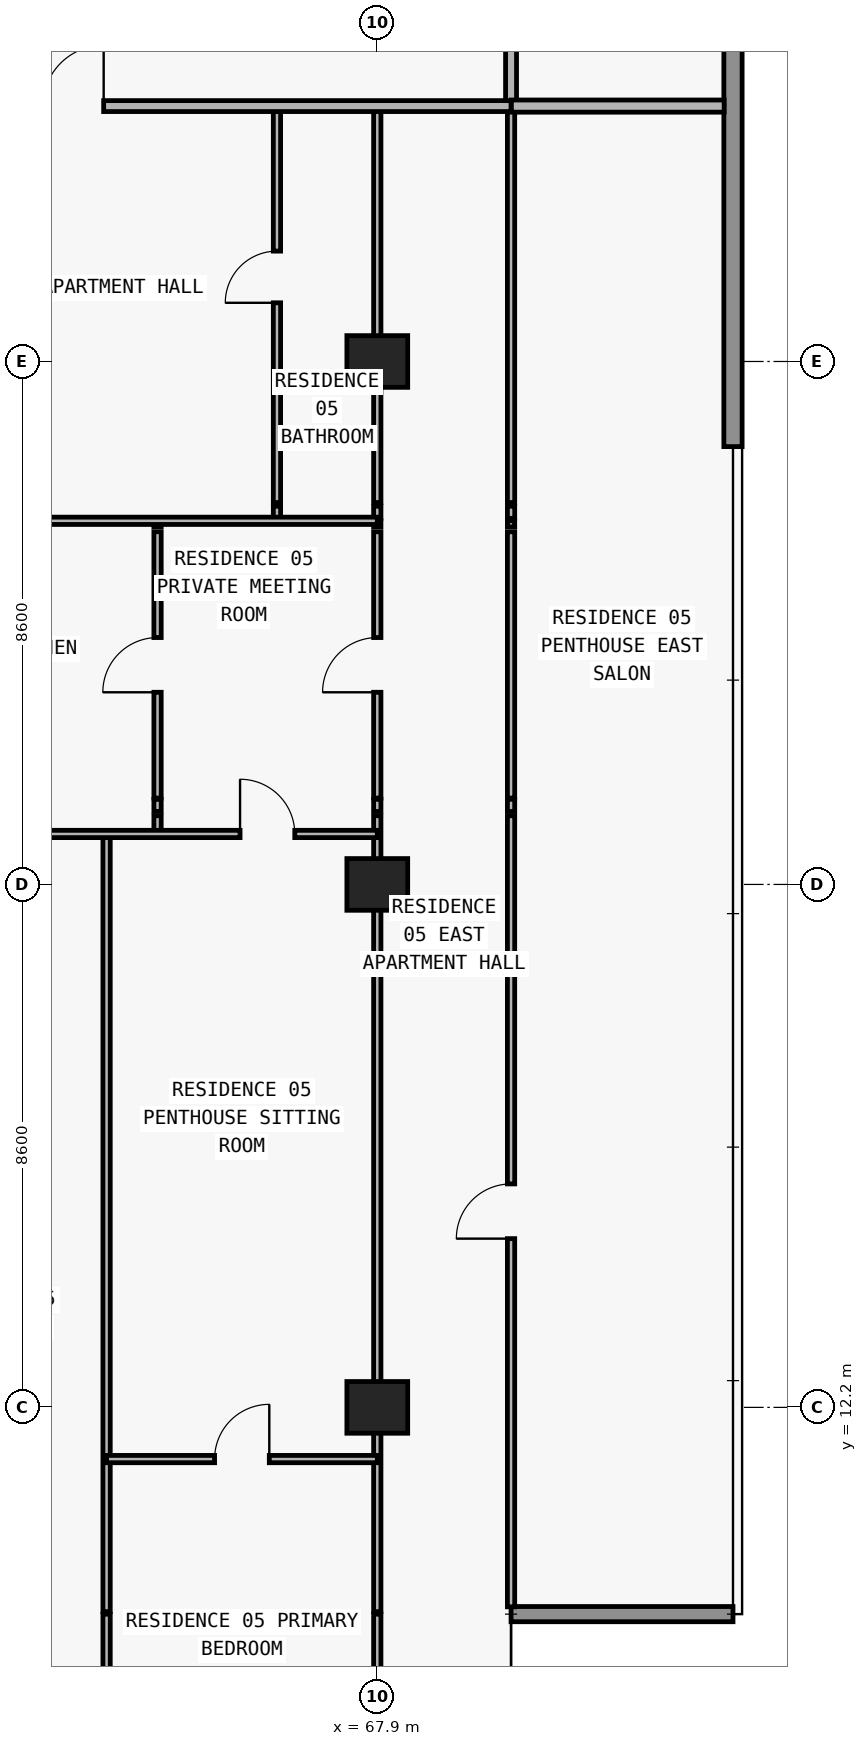
"""IFC4 building model, lengths in metres.
Left out: names, types, materials, properties, quantities, classifications, styles, units other than length and angle.
Written with IfcOpenShell. Run it as: python <this file> out.ifc"""

import sys

from ifc_helpers import new_model, si_unit, direction, frame, frame_2d, origin, origin_2d, place, context, subcontext, project, spatial, rectangle, extrude, element, fill, save


model = new_model("IFC4")
c1 = context("Model", 3, precision=1e-05, world=origin(), true_north=direction((0.0, 1.0)))
c2 = subcontext(c1, "Body", "Model", "MODEL_VIEW")
j1 = project(units=[si_unit("LENGTHUNIT", "METRE"), si_unit("PLANEANGLEUNIT", "RADIAN")], contexts=[c1])
p1 = place(None, origin())
s1 = spatial("IfcSite", under=j1, at=p1, CompositionType="ELEMENT")
p2 = place(p1, origin())
s2 = spatial("IfcBuilding", under=s1, at=p2, CompositionType="ELEMENT")
p3 = place(p2, frame((0.0, 0.0, 112.5)))
s3 = spatial("IfcBuildingStorey", under=s2, at=p3, CompositionType="ELEMENT", Elevation=112.5)
for number, where, z_axis, x_axis in (
    (1, (67.9, 12.2, 0.0), (0.0, 0.0, 1.0), (1.0, 0.0, 0.0)),
    (2, (67.9, 20.8, 0.0), (0.0, 0.0, 1.0), (1.0, 0.0, 0.0)),
    (3, (67.9, 29.4, 0.0), (0.0, 0.0, 1.0), (1.0, 0.0, 0.0)),
):
    element("IfcColumn", number, at=place(p3, frame(where, z_axis=z_axis, x_axis=x_axis)), inside=s3, PredefinedType="COLUMN", context=c2, shape_type="SweptSolid", body=[
        extrude(rectangle(XDim=1.0, YDim=0.85, at=origin_2d()), origin(), (0.0, 0.0, 1.0), 3.05),
    ])
p4 = place(p3, frame((70.1, 8.8, 0.0), z_axis=(0.0, 0.0, 1.0), x_axis=(1.0, 0.0, 0.0)))
e4 = element("IfcWall", 4, at=p4, inside=s3, PredefinedType="ELEMENTEDWALL", context=c2, shape_type="SweptSolid", body=[
    extrude(rectangle(XDim=3.65, YDim=0.25, at=frame_2d((1.825, 0.0))), origin(), (0.0, 0.0, 1.0), 3.05),
])
p5 = place(p3, frame((73.75, 47.2, 0.0), z_axis=(0.0, 0.0, 1.0), x_axis=(0.0, -1.0, 0.0)))
e5 = element("IfcWall", 5, at=p5, inside=s3, PredefinedType="STANDARD", context=c2, shape_type="SweptSolid", body=[
    extrude(rectangle(XDim=19.2, YDim=0.3, at=frame_2d((9.6, 0.0))), origin(), (0.0, 0.0, 1.0), 3.05),
])
p6 = place(p3, frame((63.448, 5.695, 0.0), z_axis=(0.0, 0.0, 1.0), x_axis=(0.0, 1.0, 0.0)))
e6 = element("IfcWall", 6, at=p6, inside=s3, PredefinedType="PARTITIONING", context=c2, shape_type="SweptSolid", body=[
    extrude(rectangle(XDim=3.105, YDim=0.12, at=frame_2d((1.552, 0.0))), origin(), (0.0, 0.0, 1.0), 3.05),
])
p7 = place(p3, frame((63.448, 8.84, 0.0), z_axis=(0.0, 0.0, 1.0), x_axis=(0.0, 1.0, 0.0)))
e7 = element("IfcWall", 7, at=p7, inside=s3, PredefinedType="PARTITIONING", context=c2, shape_type="SweptSolid", body=[
    extrude(rectangle(XDim=12.79, YDim=0.12, at=frame_2d((6.395, 0.0))), origin(), (0.0, 0.0, 1.0), 3.05),
])
p8 = place(p3, frame((64.286, 21.63, 0.0), z_axis=(0.0, 0.0, 1.0), x_axis=(0.0, 1.0, 0.0)))
e8 = element("IfcWall", 8, at=p8, inside=s3, PredefinedType="PARTITIONING", context=c2, shape_type="SweptSolid", body=[
    extrude(rectangle(XDim=0.3, YDim=0.12, at=frame_2d((0.15, 0.0))), origin(), (0.0, 0.0, 1.0), 3.05),
])
p9 = place(p3, frame((64.286, 22.0, 0.0), z_axis=(0.0, 0.0, 1.0), x_axis=(0.0, 1.0, 0.0)))
e9 = element("IfcWall", 9, at=p9, inside=s3, PredefinedType="PARTITIONING", context=c2, shape_type="SweptSolid", body=[
    extrude(rectangle(XDim=0.2, YDim=0.12, at=frame_2d((0.1, 0.0))), origin(), (0.0, 0.0, 1.0), 3.05),
])
p10 = place(p3, frame((64.286, 22.22, 0.0), z_axis=(0.0, 0.0, 1.0), x_axis=(0.0, 1.0, 0.0)))
e10 = element("IfcWall", 10, at=p10, inside=s3, PredefinedType="PARTITIONING", context=c2, shape_type="SweptSolid", body=[
    extrude(rectangle(XDim=4.38, YDim=0.12, at=frame_2d((2.19, 0.0))), origin(), (0.0, 0.0, 1.0), 3.05),
])
p11 = place(p10, frame((1.74, 0.0, 0.0)))
e11 = element("IfcOpeningElement", 11, at=p11, cuts=e10, PredefinedType="OPENING", context=c2, shape_type="SweptSolid", body=[
    extrude(rectangle(XDim=0.9, YDim=2.15, at=frame_2d((0.45, 1.075))), frame((0.0, 0.07, 0.0), z_axis=(0.0, -1.0, 0.0), x_axis=(1.0, 0.0, 0.0)), (0.0, 0.0, 1.0), 0.14),
])
p12 = place(p3, frame((64.286, 26.68, 0.0), z_axis=(0.0, 0.0, 1.0), x_axis=(0.0, 1.0, 0.0)))
e12 = element("IfcWall", 12, at=p12, inside=s3, PredefinedType="PARTITIONING", context=c2, shape_type="SweptSolid", body=[
    extrude(rectangle(XDim=0.1, YDim=0.12, at=frame_2d((0.05, 0.0))), origin(), (0.0, 0.0, 1.0), 3.05),
])
p13 = place(p3, frame((66.25, 26.82, 0.0), z_axis=(0.0, 0.0, 1.0), x_axis=(0.0, 1.0, 0.0)))
e13 = element("IfcWall", 13, at=p13, inside=s3, PredefinedType="PARTITIONING", context=c2, shape_type="SweptSolid", body=[
    extrude(rectangle(XDim=0.2, YDim=0.12, at=frame_2d((0.1, 0.0))), origin(), (0.0, 0.0, 1.0), 3.05),
])
p14 = place(p3, frame((66.25, 27.08, 0.0), z_axis=(0.0, 0.0, 1.0), x_axis=(0.0, 1.0, 0.0)))
e14 = element("IfcWall", 14, at=p14, inside=s3, PredefinedType="PARTITIONING", context=c2, shape_type="SweptSolid", body=[
    extrude(rectangle(XDim=6.52, YDim=0.12, at=frame_2d((3.26, 0.0))), origin(), (0.0, 0.0, 1.0), 3.05),
])
p15 = place(p14, frame((3.285, 0.0, 0.0)))
e15 = element("IfcOpeningElement", 15, at=p15, cuts=e14, PredefinedType="OPENING", context=c2, shape_type="SweptSolid", body=[
    extrude(rectangle(XDim=0.85, YDim=2.1, at=frame_2d((0.425, 1.05))), frame((0.0, 0.07, 0.0), z_axis=(0.0, -1.0, 0.0), x_axis=(1.0, 0.0, 0.0)), (0.0, 0.0, 1.0), 0.14),
])
p16 = place(p3, frame((67.9, 5.695, 0.0), z_axis=(0.0, 0.0, 1.0), x_axis=(0.0, 1.0, 0.0)))
e16 = element("IfcWall", 16, at=p16, inside=s3, PredefinedType="PARTITIONING", context=c2, shape_type="SweptSolid", body=[
    extrude(rectangle(XDim=3.105, YDim=0.12, at=frame_2d((1.552, 0.0))), origin(), (0.0, 0.0, 1.0), 3.05),
])
p17 = place(p3, frame((67.9, 8.84, 0.0), z_axis=(0.0, 0.0, 1.0), x_axis=(0.0, 1.0, 0.0)))
e17 = element("IfcWall", 17, at=p17, inside=s3, PredefinedType="PARTITIONING", context=c2, shape_type="SweptSolid", body=[
    extrude(rectangle(XDim=13.09, YDim=0.12, at=frame_2d((6.545, 0.0))), origin(), (0.0, 0.0, 1.0), 2.174),
])
p18 = place(p3, frame((67.9, 22.0, 0.0), z_axis=(0.0, 0.0, 1.0), x_axis=(0.0, 1.0, 0.0)))
e18 = element("IfcWall", 18, at=p18, inside=s3, PredefinedType="PARTITIONING", context=c2, shape_type="SweptSolid", body=[
    extrude(rectangle(XDim=0.2, YDim=0.12, at=frame_2d((0.1, 0.0))), origin(), (0.0, 0.0, 1.0), 2.174),
])
p19 = place(p3, frame((67.9, 22.22, 0.0), z_axis=(0.0, 0.0, 1.0), x_axis=(0.0, 1.0, 0.0)))
e19 = element("IfcWall", 19, at=p19, inside=s3, PredefinedType="PARTITIONING", context=c2, shape_type="SweptSolid", body=[
    extrude(rectangle(XDim=4.38, YDim=0.12, at=frame_2d((2.19, 0.0))), origin(), (0.0, 0.0, 1.0), 2.174),
])
p20 = place(p19, frame((1.74, 0.0, 0.0)))
e20 = element("IfcOpeningElement", 20, at=p20, cuts=e19, PredefinedType="OPENING", context=c2, shape_type="SweptSolid", body=[
    extrude(rectangle(XDim=0.9, YDim=2.124, at=frame_2d((0.45, 1.062))), frame((0.0, 0.07, 0.0), z_axis=(0.0, -1.0, 0.0), x_axis=(1.0, 0.0, 0.0)), (0.0, 0.0, 1.0), 0.14),
])
p21 = place(p3, frame((67.9, 26.68, 0.0), z_axis=(0.0, 0.0, 1.0), x_axis=(0.0, 1.0, 0.0)))
e21 = element("IfcWall", 21, at=p21, inside=s3, PredefinedType="PARTITIONING", context=c2, shape_type="SweptSolid", body=[
    extrude(rectangle(XDim=0.1, YDim=0.12, at=frame_2d((0.05, 0.0))), origin(), (0.0, 0.0, 1.0), 2.174),
])
p22 = place(p3, frame((67.9, 26.82, 0.0), z_axis=(0.0, 0.0, 1.0), x_axis=(0.0, 1.0, 0.0)))
e22 = element("IfcWall", 22, at=p22, inside=s3, PredefinedType="PARTITIONING", context=c2, shape_type="SweptSolid", body=[
    extrude(rectangle(XDim=0.2, YDim=0.12, at=frame_2d((0.1, 0.0))), origin(), (0.0, 0.0, 1.0), 2.174),
])
p23 = place(p3, frame((67.9, 27.08, 0.0), z_axis=(0.0, 0.0, 1.0), x_axis=(0.0, 1.0, 0.0)))
e23 = element("IfcWall", 23, at=p23, inside=s3, PredefinedType="PARTITIONING", context=c2, shape_type="SweptSolid", body=[
    extrude(rectangle(XDim=6.52, YDim=0.12, at=frame_2d((3.26, 0.0))), origin(), (0.0, 0.0, 1.0), 2.174),
])
p24 = place(p3, frame((70.1, 8.92, 0.0), z_axis=(0.0, 0.0, 1.0), x_axis=(0.0, 1.0, 0.0)))
e24 = element("IfcWall", 24, at=p24, inside=s3, PredefinedType="PARTITIONING", context=c2, shape_type="SweptSolid", body=[
    extrude(rectangle(XDim=13.01, YDim=0.12, at=frame_2d((6.505, 0.0))), origin(), (0.0, 0.0, 1.0), 3.05),
])
p25 = place(p24, frame((6.055, 0.0, 0.0)))
e25 = element("IfcOpeningElement", 25, at=p25, cuts=e24, PredefinedType="OPENING", context=c2, shape_type="SweptSolid", body=[
    extrude(rectangle(XDim=0.9, YDim=2.15, at=frame_2d((0.45, 1.075))), frame((0.0, 0.07, 0.0), z_axis=(0.0, -1.0, 0.0), x_axis=(1.0, 0.0, 0.0)), (0.0, 0.0, 1.0), 0.14),
])
p26 = place(p3, frame((70.1, 22.0, 0.0), z_axis=(0.0, 0.0, 1.0), x_axis=(0.0, 1.0, 0.0)))
e26 = element("IfcWall", 26, at=p26, inside=s3, PredefinedType="PARTITIONING", context=c2, shape_type="SweptSolid", body=[
    extrude(rectangle(XDim=0.2, YDim=0.12, at=frame_2d((0.1, 0.0))), origin(), (0.0, 0.0, 1.0), 3.05),
])
p27 = place(p3, frame((70.1, 22.22, 0.0), z_axis=(0.0, 0.0, 1.0), x_axis=(0.0, 1.0, 0.0)))
e27 = element("IfcWall", 27, at=p27, inside=s3, PredefinedType="PARTITIONING", context=c2, shape_type="SweptSolid", body=[
    extrude(rectangle(XDim=4.38, YDim=0.12, at=frame_2d((2.19, 0.0))), origin(), (0.0, 0.0, 1.0), 3.05),
])
p28 = place(p3, frame((70.1, 26.68, 0.0), z_axis=(0.0, 0.0, 1.0), x_axis=(0.0, 1.0, 0.0)))
e28 = element("IfcWall", 28, at=p28, inside=s3, PredefinedType="PARTITIONING", context=c2, shape_type="SweptSolid", body=[
    extrude(rectangle(XDim=0.1, YDim=0.12, at=frame_2d((0.05, 0.0))), origin(), (0.0, 0.0, 1.0), 3.05),
])
p29 = place(p3, frame((70.1, 26.82, 0.0), z_axis=(0.0, 0.0, 1.0), x_axis=(0.0, 1.0, 0.0)))
e29 = element("IfcWall", 29, at=p29, inside=s3, PredefinedType="PARTITIONING", context=c2, shape_type="SweptSolid", body=[
    extrude(rectangle(XDim=0.2, YDim=0.12, at=frame_2d((0.1, 0.0))), origin(), (0.0, 0.0, 1.0), 3.05),
])
p30 = place(p3, frame((70.1, 27.08, 0.0), z_axis=(0.0, 0.0, 1.0), x_axis=(0.0, 1.0, 0.0)))
e30 = element("IfcWall", 30, at=p30, inside=s3, PredefinedType="PARTITIONING", context=c2, shape_type="SweptSolid", body=[
    extrude(rectangle(XDim=6.52, YDim=0.12, at=frame_2d((3.26, 0.0))), origin(), (0.0, 0.0, 1.0), 3.05),
])
p31 = place(p3, frame((70.1, 33.605, 0.0), z_axis=(0.0, 0.0, 1.0), x_axis=(0.0, 1.0, 0.0)))
e31 = element("IfcWall", 31, at=p31, inside=s3, PredefinedType="PARTITIONING", context=c2, shape_type="SweptSolid", body=[
    extrude(rectangle(XDim=3.345, YDim=0.18, at=frame_2d((1.672, 0.0))), origin(), (0.0, 0.0, 1.0), 3.05),
])
p32 = place(p3, frame((63.448, 11.35, 0.0), z_axis=(0.0, 0.0, 1.0), x_axis=(1.0, 0.0, 0.0)))
e32 = element("IfcWall", 32, at=p32, inside=s3, PredefinedType="PARTITIONING", context=c2, shape_type="SweptSolid", body=[
    extrude(rectangle(XDim=4.452, YDim=0.12, at=frame_2d((2.226, 0.0))), origin(), (0.0, 0.0, 1.0), 3.05),
])
p33 = place(p32, frame((1.776, 0.0, 0.0)))
e33 = element("IfcOpeningElement", 33, at=p33, cuts=e32, PredefinedType="OPENING", context=c2, shape_type="SweptSolid", body=[
    extrude(rectangle(XDim=0.9, YDim=2.15, at=frame_2d((0.45, 1.075))), frame((0.0, 0.07, 0.0), z_axis=(0.0, -1.0, 0.0), x_axis=(1.0, 0.0, 0.0)), (0.0, 0.0, 1.0), 0.14),
])
p34 = place(p3, frame((59.55, 21.63, 0.0), z_axis=(0.0, 0.0, 1.0), x_axis=(1.0, 0.0, 0.0)))
e34 = element("IfcWall", 34, at=p34, inside=s3, PredefinedType="PARTITIONING", context=c2, shape_type="SweptSolid", body=[
    extrude(rectangle(XDim=8.35, YDim=0.12, at=frame_2d((4.175, 0.0))), origin(), (0.0, 0.0, 1.0), 3.05),
])
p35 = place(p34, frame((1.499, 0.0, 0.0)))
e35 = element("IfcOpeningElement", 35, at=p35, cuts=e34, PredefinedType="OPENING", context=c2, shape_type="SweptSolid", body=[
    extrude(rectangle(XDim=0.9, YDim=2.15, at=frame_2d((0.45, 1.075))), frame((0.0, 0.07, 0.0), z_axis=(0.0, -1.0, 0.0), x_axis=(1.0, 0.0, 0.0)), (0.0, 0.0, 1.0), 0.14),
])
p36 = place(p34, frame((6.093, 0.0, 0.0)))
e36 = element("IfcOpeningElement", 36, at=p36, cuts=e34, PredefinedType="OPENING", context=c2, shape_type="SweptSolid", body=[
    extrude(rectangle(XDim=0.9, YDim=2.15, at=frame_2d((0.45, 1.075))), frame((0.0, 0.07, 0.0), z_axis=(0.0, -1.0, 0.0), x_axis=(1.0, 0.0, 0.0)), (0.0, 0.0, 1.0), 0.14),
])
p37 = place(p3, frame((59.55, 26.78, 0.0), z_axis=(0.0, 0.0, 1.0), x_axis=(1.0, 0.0, 0.0)))
e37 = element("IfcWall", 37, at=p37, inside=s3, PredefinedType="PARTITIONING", context=c2, shape_type="SweptSolid", body=[
    extrude(rectangle(XDim=8.35, YDim=0.12, at=frame_2d((4.175, 0.0))), origin(), (0.0, 0.0, 1.0), 3.05),
])
p38 = place(p37, frame((1.918, 0.0, 0.0)))
e38 = element("IfcOpeningElement", 38, at=p38, cuts=e37, PredefinedType="OPENING", context=c2, shape_type="SweptSolid", body=[
    extrude(rectangle(XDim=0.9, YDim=2.15, at=frame_2d((0.45, 1.075))), frame((0.0, 0.07, 0.0), z_axis=(0.0, -1.0, 0.0), x_axis=(1.0, 0.0, 0.0)), (0.0, 0.0, 1.0), 0.14),
])
p39 = place(p3, frame((59.55, 33.6, 0.0), z_axis=(0.0, 0.0, 1.0), x_axis=(1.0, 0.0, 0.0)))
e39 = element("IfcWall", 39, at=p39, inside=s3, PredefinedType="PARTITIONING", context=c2, shape_type="SweptSolid", body=[
    extrude(rectangle(XDim=10.55, YDim=0.18, at=frame_2d((5.275, 0.0))), origin(), (0.0, 0.0, 1.0), 3.05),
])
p40 = place(p39, frame((2.85, 0.0, 0.0)))
e40 = element("IfcOpeningElement", 40, at=p40, cuts=e39, PredefinedType="OPENING", context=c2, shape_type="SweptSolid", body=[
    extrude(rectangle(XDim=1.0, YDim=2.2, at=frame_2d((0.5, 1.1))), frame((0.0, 0.1, 0.0), z_axis=(0.0, -1.0, 0.0), x_axis=(1.0, 0.0, 0.0)), (0.0, 0.0, 1.0), 0.2),
])
p41 = place(p3, frame((70.105, 33.6, 0.0), z_axis=(0.0, 0.0, 1.0), x_axis=(1.0, 0.0, 0.0)))
e41 = element("IfcWall", 41, at=p41, inside=s3, PredefinedType="PARTITIONING", context=c2, shape_type="SweptSolid", body=[
    extrude(rectangle(XDim=3.5, YDim=0.2, at=frame_2d((1.75, 0.0))), origin(), (0.0, 0.0, 1.0), 3.05),
])
p42 = place(p40, origin())
e42 = element("IfcDoor", 42, at=p42, inside=s3, OperationType="SINGLE_SWING_RIGHT", PredefinedType="DOOR", context=c2, shape_type="SweptSolid", body=[
    extrude(rectangle(XDim=1.0, YDim=2.2, at=frame_2d((0.5, 1.1))), frame((0.0, 0.025, 0.0), z_axis=(0.0, -1.0, 0.0), x_axis=(1.0, 0.0, 0.0)), (0.0, 0.0, 1.0), 0.05),
])
fill(e40, e42)
p43 = place(p15, origin())
e43 = element("IfcDoor", 43, at=p43, inside=s3, OperationType="SINGLE_SWING_LEFT", PredefinedType="DOOR", context=c2, shape_type="SweptSolid", body=[
    extrude(rectangle(XDim=0.85, YDim=2.1, at=frame_2d((0.425, 1.05))), frame((0.0, 0.025, 0.0), z_axis=(0.0, -1.0, 0.0), x_axis=(1.0, 0.0, 0.0)), (0.0, 0.0, 1.0), 0.05),
])
fill(e15, e43)
p44 = place(p11, origin())
e44 = element("IfcDoor", 44, at=p44, inside=s3, OperationType="SINGLE_SWING_LEFT", PredefinedType="DOOR", context=c2, shape_type="SweptSolid", body=[
    extrude(rectangle(XDim=0.9, YDim=2.15, at=frame_2d((0.45, 1.075))), frame((0.0, 0.025, 0.0), z_axis=(0.0, -1.0, 0.0), x_axis=(1.0, 0.0, 0.0)), (0.0, 0.0, 1.0), 0.05),
])
fill(e11, e44)
p45 = place(p36, origin())
e45 = element("IfcDoor", 45, at=p45, inside=s3, OperationType="SINGLE_SWING_LEFT", PredefinedType="DOOR", context=c2, shape_type="SweptSolid", body=[
    extrude(rectangle(XDim=0.9, YDim=2.15, at=frame_2d((0.45, 1.075))), frame((0.0, 0.025, 0.0), z_axis=(0.0, -1.0, 0.0), x_axis=(1.0, 0.0, 0.0)), (0.0, 0.0, 1.0), 0.05),
])
fill(e36, e45)
p46 = place(p33, origin())
e46 = element("IfcDoor", 46, at=p46, inside=s3, OperationType="SINGLE_SWING_RIGHT", PredefinedType="DOOR", context=c2, shape_type="SweptSolid", body=[
    extrude(rectangle(XDim=0.9, YDim=2.15, at=frame_2d((0.45, 1.075))), frame((0.0, 0.025, 0.0), z_axis=(0.0, -1.0, 0.0), x_axis=(1.0, 0.0, 0.0)), (0.0, 0.0, 1.0), 0.05),
])
fill(e33, e46)
p47 = place(p20, origin())
e47 = element("IfcDoor", 47, at=p47, inside=s3, OperationType="SINGLE_SWING_LEFT", PredefinedType="DOOR", context=c2, shape_type="SweptSolid", body=[
    extrude(rectangle(XDim=0.9, YDim=2.124, at=frame_2d((0.45, 1.062))), frame((0.0, 0.025, 0.0), z_axis=(0.0, -1.0, 0.0), x_axis=(1.0, 0.0, 0.0)), (0.0, 0.0, 1.0), 0.05),
])
fill(e20, e47)
p48 = place(p25, origin())
e48 = element("IfcDoor", 48, at=p48, inside=s3, OperationType="SINGLE_SWING_LEFT", PredefinedType="DOOR", context=c2, shape_type="SweptSolid", body=[
    extrude(rectangle(XDim=0.9, YDim=2.15, at=frame_2d((0.45, 1.075))), frame((0.0, 0.025, 0.0), z_axis=(0.0, -1.0, 0.0), x_axis=(1.0, 0.0, 0.0)), (0.0, 0.0, 1.0), 0.05),
])
fill(e25, e48)
save(model, sys.argv[1])
